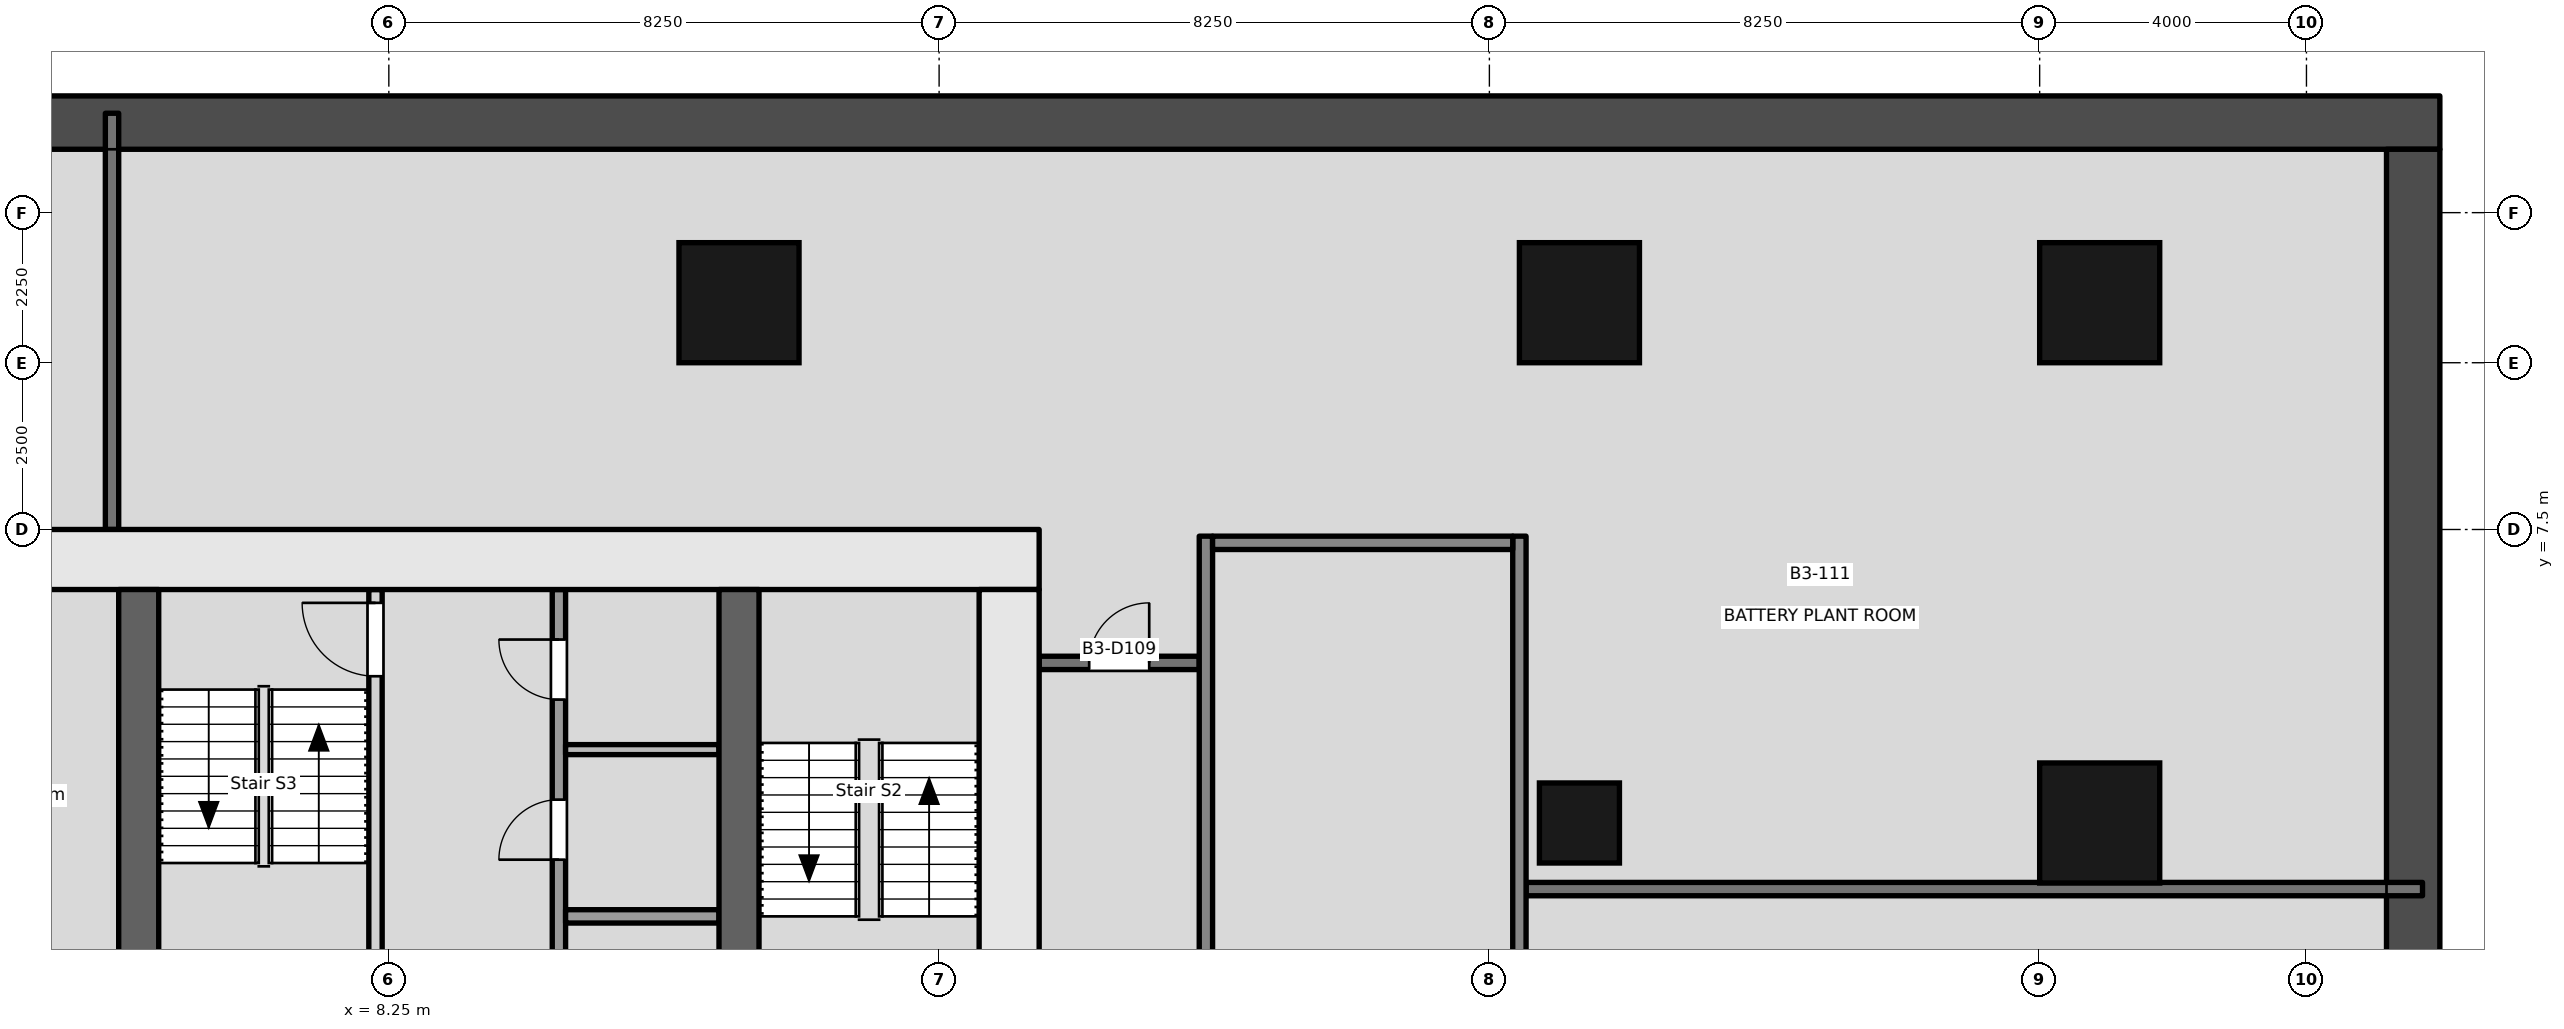
"""IFC4 building model, lengths in metres.
Left out: names, types, materials, properties, quantities, classifications, styles, units other than length and angle.
Written with IfcOpenShell. Run it as: python <this file> out.ifc"""

import sys

from ifc_helpers import new_model, si_unit, direction, frame, frame_2d, origin, origin_2d, place, context, subcontext, project, spatial, rectangle, extrude, element, fill, save


model = new_model("IFC4")
c1 = context("Model", 3, precision=1e-05, world=origin(), true_north=direction((0.0, 1.0)))
c2 = subcontext(c1, "Body", "Model", "MODEL_VIEW")
j1 = project(units=[si_unit("LENGTHUNIT", "METRE"), si_unit("PLANEANGLEUNIT", "RADIAN")], contexts=[c1])
p1 = place(None, origin())
s1 = spatial("IfcSite", under=j1, at=p1, CompositionType="ELEMENT")
p2 = place(p1, origin())
s2 = spatial("IfcBuilding", under=s1, at=p2, CompositionType="ELEMENT")
p3 = place(p2, frame((0.0, 0.0, -13.5)))
s3 = spatial("IfcBuildingStorey", under=s2, at=p3, CompositionType="ELEMENT", Elevation=-13.5)
p4 = place(p3, frame((-39.0, 13.6, -0.25), z_axis=(0.0, 0.0, 1.0), x_axis=(1.0, 0.0, 0.0)))
e1 = element("IfcWall", 1, at=p4, inside=s3, PredefinedType="SOLIDWALL", context=c2, shape_type="SweptSolid", body=[
    extrude(rectangle(XDim=78.0, YDim=0.8, at=frame_2d((39.0, 0.0))), origin(), (0.0, 0.0, 1.0), 4.05),
])
p5 = place(p3, frame((38.6, -38.7, -0.25), z_axis=(0.0, 0.0, 1.0), x_axis=(0.0, 1.0, 0.0)))
e2 = element("IfcWall", 2, at=p5, inside=s3, PredefinedType="SOLIDWALL", context=c2, shape_type="SweptSolid", body=[
    extrude(rectangle(XDim=51.9, YDim=0.8, at=frame_2d((25.95, 0.0))), origin(), (0.0, 0.0, 1.0), 4.05),
])
for number, where, z_axis, x_axis in (
    (3, (33.9, 10.9, -0.25), (0.0, 0.0, 1.0), (1.0, 0.0, 0.0)),
    (4, (33.9, 3.1, -0.25), (0.0, 0.0, 1.0), (0.0, 1.0, 0.0)),
    (5, (13.5, 10.9, -0.25), (0.0, 0.0, 1.0), (1.0, 0.0, 0.0)),
    (6, (26.1, 10.9, -0.25), (0.0, 0.0, 1.0), (1.0, 0.0, 0.0)),
):
    element("IfcColumn", number, at=place(p3, frame(where, z_axis=z_axis, x_axis=x_axis)), inside=s3, PredefinedType="COLUMN", context=c2, shape_type="SweptSolid", body=[
        extrude(rectangle(XDim=1.8, YDim=1.8, at=origin_2d()), origin(), (0.0, 0.0, 1.0), 4.05),
    ])
p6 = place(p3, frame((26.1, 3.1, -0.25), z_axis=(0.0, 0.0, 1.0), x_axis=(1.0, 0.0, 0.0)))
e7 = element("IfcColumn", 7, at=p6, inside=s3, PredefinedType="COLUMN", context=c2, shape_type="SweptSolid", body=[
    extrude(rectangle(XDim=1.2, YDim=1.2, at=origin_2d()), origin(), (0.0, 0.0, 1.0), 4.05),
])
p7 = place(p3, frame((-18.0, 7.05, -0.2), z_axis=(0.0, 0.0, 1.0), x_axis=(1.0, 0.0, 0.0)))
e8 = element("IfcWall", 8, at=p7, inside=s3, PredefinedType="SHEAR", context=c2, shape_type="SweptSolid", body=[
    extrude(rectangle(XDim=36.0, YDim=0.9, at=frame_2d((18.0, 0.0))), origin(), (0.0, 0.0, 1.0), 4.0),
])
p8 = place(p3, frame((17.55, -6.6, -0.2), z_axis=(0.0, 0.0, 1.0), x_axis=(0.0, 1.0, 0.0)))
e9 = element("IfcWall", 9, at=p8, inside=s3, PredefinedType="SHEAR", context=c2, shape_type="SweptSolid", body=[
    extrude(rectangle(XDim=13.2, YDim=0.9, at=frame_2d((6.6, 0.0))), origin(), (0.0, 0.0, 1.0), 4.0),
])
p9 = place(p8, frame((4.55, 0.0, 0.2)))
e10 = element("IfcOpeningElement", 10, at=p9, cuts=e9, PredefinedType="OPENING", context=c2, shape_type="SweptSolid", body=[
    extrude(rectangle(XDim=1.2, YDim=2.1, at=frame_2d((0.6, 1.05))), frame((0.0, 0.46, 0.0), z_axis=(0.0, -1.0, 0.0), x_axis=(1.0, 0.0, 0.0)), (0.0, 0.0, 1.0), 0.921),
])
for number, where, z_axis, x_axis in (
    (11, (4.5, -6.6, -0.2), (0.0, 0.0, 1.0), (0.0, 1.0, 0.0)),
    (12, (13.5, -6.6, -0.2), (0.0, 0.0, 1.0), (0.0, 1.0, 0.0)),
):
    element("IfcWall", number, at=place(p3, frame(where, z_axis=z_axis, x_axis=x_axis)), inside=s3, PredefinedType="SHEAR", context=c2, shape_type="SweptSolid", body=[
        extrude(rectangle(XDim=13.2, YDim=0.6, at=frame_2d((6.6, 0.0))), origin(), (0.0, 0.0, 1.0), 4.0),
    ])
p10 = place(p3, frame((8.05, -6.6, 0.0), z_axis=(0.0, 0.0, 1.0), x_axis=(0.0, 1.0, 0.0)))
e13 = element("IfcWall", 13, at=p10, inside=s3, PredefinedType="PARTITIONING", context=c2, shape_type="SweptSolid", body=[
    extrude(rectangle(XDim=13.2, YDim=0.2, at=frame_2d((6.6, 0.0))), origin(), (0.0, 0.0, 1.0), 3.8),
])
p11 = place(p10, frame((0.91, 0.0, 0.0)))
e14 = element("IfcOpeningElement", 14, at=p11, cuts=e13, PredefinedType="OPENING", context=c2, shape_type="SweptSolid", body=[
    extrude(rectangle(XDim=0.9, YDim=2.1, at=frame_2d((0.45, 1.05))), frame((0.0, 0.111, 0.0), z_axis=(0.0, -1.0, 0.0), x_axis=(1.0, 0.0, 0.0)), (0.0, 0.0, 1.0), 0.221),
])
p12 = place(p10, frame((3.46, 0.0, 0.0)))
e15 = element("IfcOpeningElement", 15, at=p12, cuts=e13, PredefinedType="OPENING", context=c2, shape_type="SweptSolid", body=[
    extrude(rectangle(XDim=0.9, YDim=2.1, at=frame_2d((0.45, 1.05))), frame((0.0, 0.111, 0.0), z_axis=(0.0, -1.0, 0.0), x_axis=(1.0, 0.0, 0.0)), (0.0, 0.0, 1.0), 0.221),
])
p13 = place(p10, frame((5.5, 0.0, 0.0)))
e16 = element("IfcOpeningElement", 16, at=p13, cuts=e13, PredefinedType="OPENING", context=c2, shape_type="SweptSolid", body=[
    extrude(rectangle(XDim=0.9, YDim=2.1, at=frame_2d((0.45, 1.05))), frame((0.0, 0.111, 0.0), z_axis=(0.0, -1.0, 0.0), x_axis=(1.0, 0.0, 0.0)), (0.0, 0.0, 1.0), 0.221),
])
p14 = place(p10, frame((11.9, 0.0, 0.0)))
e17 = element("IfcOpeningElement", 17, at=p14, cuts=e13, PredefinedType="OPENING", context=c2, shape_type="SweptSolid", body=[
    extrude(rectangle(XDim=1.1, YDim=2.1, at=frame_2d((0.55, 1.05))), frame((0.0, 0.111, 0.0), z_axis=(0.0, -1.0, 0.0), x_axis=(1.0, 0.0, 0.0)), (0.0, 0.0, 1.0), 0.221),
])
p15 = place(p3, frame((10.8, -6.6, 0.0), z_axis=(0.0, 0.0, 1.0), x_axis=(0.0, 1.0, 0.0)))
e18 = element("IfcWall", 18, at=p15, inside=s3, PredefinedType="PARTITIONING", context=c2, shape_type="SweptSolid", body=[
    extrude(rectangle(XDim=13.2, YDim=0.2, at=frame_2d((6.6, 0.0))), origin(), (0.0, 0.0, 1.0), 3.8),
])
p16 = place(p15, frame((0.7, 0.0, 0.0)))
e19 = element("IfcOpeningElement", 19, at=p16, cuts=e18, PredefinedType="OPENING", context=c2, shape_type="SweptSolid", body=[
    extrude(rectangle(XDim=1.2, YDim=2.1, at=frame_2d((0.6, 1.05))), frame((0.0, 0.111, 0.0), z_axis=(0.0, -1.0, 0.0), x_axis=(1.0, 0.0, 0.0)), (0.0, 0.0, 1.0), 0.221),
])
p17 = place(p15, frame((3.6, 0.0, 0.0)))
e20 = element("IfcOpeningElement", 20, at=p17, cuts=e18, PredefinedType="OPENING", context=c2, shape_type="SweptSolid", body=[
    extrude(rectangle(XDim=1.0, YDim=2.1, at=frame_2d((0.5, 1.05))), frame((0.0, 0.111, 0.0), z_axis=(0.0, -1.0, 0.0), x_axis=(1.0, 0.0, 0.0)), (0.0, 0.0, 1.0), 0.221),
])
p18 = place(p15, frame((6.4, 0.0, 0.0)))
e21 = element("IfcOpeningElement", 21, at=p18, cuts=e18, PredefinedType="OPENING", context=c2, shape_type="SweptSolid", body=[
    extrude(rectangle(XDim=1.0, YDim=2.1, at=frame_2d((0.5, 1.05))), frame((0.0, 0.111, 0.0), z_axis=(0.0, -1.0, 0.0), x_axis=(1.0, 0.0, 0.0)), (0.0, 0.0, 1.0), 0.221),
])
p19 = place(p15, frame((9.15, 0.0, 0.0)))
e22 = element("IfcOpeningElement", 22, at=p19, cuts=e18, PredefinedType="OPENING", context=c2, shape_type="SweptSolid", body=[
    extrude(rectangle(XDim=0.9, YDim=2.1, at=frame_2d((0.45, 1.05))), frame((0.0, 0.111, 0.0), z_axis=(0.0, -1.0, 0.0), x_axis=(1.0, 0.0, 0.0)), (0.0, 0.0, 1.0), 0.221),
])
p20 = place(p15, frame((11.55, 0.0, 0.0)))
e23 = element("IfcOpeningElement", 23, at=p20, cuts=e18, PredefinedType="OPENING", context=c2, shape_type="SweptSolid", body=[
    extrude(rectangle(XDim=0.9, YDim=2.1, at=frame_2d((0.45, 1.05))), frame((0.0, 0.111, 0.0), z_axis=(0.0, -1.0, 0.0), x_axis=(1.0, 0.0, 0.0)), (0.0, 0.0, 1.0), 0.221),
])
p21 = place(p3, frame((10.9, 1.7, 0.0), z_axis=(0.0, 0.0, 1.0), x_axis=(1.0, 0.0, 0.0)))
e24 = element("IfcWall", 24, at=p21, inside=s3, PredefinedType="PARTITIONING", context=c2, shape_type="SweptSolid", body=[
    extrude(rectangle(XDim=2.3, YDim=0.2, at=frame_2d((1.15, 0.0))), origin(), (0.0, 0.0, 1.0), 3.8),
])
p22 = place(p3, frame((10.9, 4.2, 0.0), z_axis=(0.0, 0.0, 1.0), x_axis=(1.0, 0.0, 0.0)))
e25 = element("IfcWall", 25, at=p22, inside=s3, PredefinedType="PARTITIONING", context=c2, shape_type="SweptSolid", body=[
    extrude(rectangle(XDim=2.3, YDim=0.15, at=frame_2d((1.15, 0.0))), origin(), (0.0, 0.0, 1.0), 3.8),
])
for number, where, z_axis, x_axis in (
    (26, (20.5, 0.0, -0.25), (0.0, 0.0, 1.0), (0.0, 1.0, 0.0)),
    (27, (25.2, 0.0, -0.25), (0.0, 0.0, 1.0), (0.0, 1.0, 0.0)),
):
    element("IfcWall", number, at=place(p3, frame(where, z_axis=z_axis, x_axis=x_axis)), inside=s3, PredefinedType="SHEAR", context=c2, shape_type="SweptSolid", body=[
        extrude(rectangle(XDim=7.4, YDim=0.2, at=frame_2d((3.7, 0.0))), origin(), (0.0, 0.0, 1.0), 4.05),
    ])
p23 = place(p3, frame((20.6, 7.3, -0.25), z_axis=(0.0, 0.0, 1.0), x_axis=(1.0, 0.0, 0.0)))
e28 = element("IfcWall", 28, at=p23, inside=s3, PredefinedType="SHEAR", context=c2, shape_type="SweptSolid", body=[
    extrude(rectangle(XDim=4.5, YDim=0.2, at=frame_2d((2.25, 0.0))), origin(), (0.0, 0.0, 1.0), 4.05),
])
p24 = place(p3, frame((18.0, 5.5, 0.0), z_axis=(0.0, 0.0, 1.0), x_axis=(1.0, 0.0, 0.0)))
e29 = element("IfcWall", 29, at=p24, inside=s3, PredefinedType="PARTITIONING", context=c2, shape_type="SweptSolid", body=[
    extrude(rectangle(XDim=2.4, YDim=0.2, at=frame_2d((1.2, 0.0))), origin(), (0.0, 0.0, 1.0), 3.8),
])
p25 = place(p24, frame((0.75, 0.0, 0.0)))
e30 = element("IfcOpeningElement", 30, at=p25, cuts=e29, PredefinedType="OPENING", context=c2, shape_type="SweptSolid", body=[
    extrude(rectangle(XDim=0.9, YDim=2.1, at=frame_2d((0.45, 1.05))), frame((0.0, 0.111, 0.0), z_axis=(0.0, -1.0, 0.0), x_axis=(1.0, 0.0, 0.0)), (0.0, 0.0, 1.0), 0.221),
])
p26 = place(p3, frame((4.1, 13.74, 0.0), z_axis=(0.0, 0.0, 1.0), x_axis=(0.0, -1.0, 0.0)))
e31 = element("IfcWall", 31, at=p26, inside=s3, PredefinedType="PARTITIONING", context=c2, shape_type="SweptSolid", body=[
    extrude(rectangle(XDim=6.24, YDim=0.2, at=frame_2d((3.12, 0.0))), origin(), (0.0, 0.0, 1.0), 2.8),
])
p27 = place(p3, frame((25.3, 2.109, 0.0), z_axis=(0.0, 0.0, 1.0), x_axis=(1.0, 0.0, 0.0)))
e32 = element("IfcWall", 32, at=p27, inside=s3, PredefinedType="PARTITIONING", context=c2, shape_type="SweptSolid", body=[
    extrude(rectangle(XDim=13.44, YDim=0.2, at=frame_2d((6.72, 0.0))), origin(), (0.0, 0.0, 1.0), 2.6),
])
p28 = place(p14, origin())
e33 = element("IfcDoor", 33, at=p28, inside=s3, OperationType="SINGLE_SWING_RIGHT", PredefinedType="DOOR", context=c2, shape_type="SweptSolid", body=[
    extrude(rectangle(XDim=1.1, YDim=2.1, at=frame_2d((0.55, 1.05))), frame((0.0, 0.025, 0.0), z_axis=(0.0, -1.0, 0.0), x_axis=(1.0, 0.0, 0.0)), (0.0, 0.0, 1.0), 0.05),
])
fill(e17, e33)
p29 = place(p19, origin())
e34 = element("IfcDoor", 34, at=p29, inside=s3, OperationType="SINGLE_SWING_LEFT", PredefinedType="DOOR", context=c2, shape_type="SweptSolid", body=[
    extrude(rectangle(XDim=0.9, YDim=2.1, at=frame_2d((0.45, 1.05))), frame((0.0, 0.025, 0.0), z_axis=(0.0, -1.0, 0.0), x_axis=(1.0, 0.0, 0.0)), (0.0, 0.0, 1.0), 0.05),
])
fill(e22, e34)
p30 = place(p20, origin())
e35 = element("IfcDoor", 35, at=p30, inside=s3, OperationType="SINGLE_SWING_RIGHT", PredefinedType="DOOR", context=c2, shape_type="SweptSolid", body=[
    extrude(rectangle(XDim=0.9, YDim=2.1, at=frame_2d((0.45, 1.05))), frame((0.0, 0.025, 0.0), z_axis=(0.0, -1.0, 0.0), x_axis=(1.0, 0.0, 0.0)), (0.0, 0.0, 1.0), 0.05),
])
fill(e23, e35)
p31 = place(p25, origin())
e36 = element("IfcDoor", 36, at=p31, inside=s3, OperationType="SINGLE_SWING_RIGHT", PredefinedType="DOOR", context=c2, shape_type="SweptSolid", body=[
    extrude(rectangle(XDim=0.9, YDim=2.1, at=frame_2d((0.45, 1.05))), frame((0.0, 0.025, 0.0), z_axis=(0.0, -1.0, 0.0), x_axis=(1.0, 0.0, 0.0)), (0.0, 0.0, 1.0), 0.05),
])
fill(e30, e36)
save(model, sys.argv[1])
